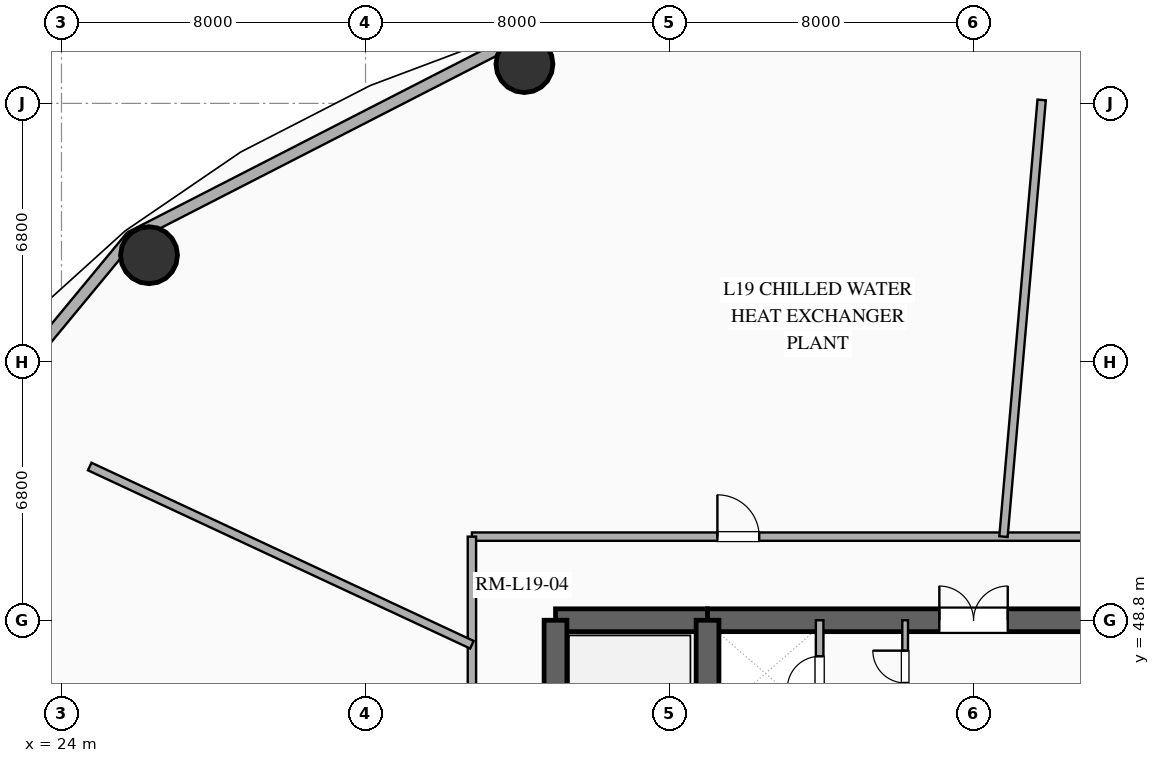
"""IFC4 building model, lengths in metres.
Left out: names, types, materials, properties, quantities, classifications, styles, units other than length and angle.
Written with IfcOpenShell. Run it as: python <this file> out.ifc"""

import sys

from ifc_helpers import new_model, si_unit, direction, frame, frame_2d, origin, origin_2d, place, context, subcontext, project, spatial, rectangle, hollow_circle, extrude, element, fill, save


model = new_model("IFC4")
c1 = context("Model", 3, precision=1e-05, world=origin(), true_north=direction((0.0, 1.0)))
c2 = subcontext(c1, "Body", "Model", "MODEL_VIEW")
j1 = project(units=[si_unit("LENGTHUNIT", "METRE"), si_unit("PLANEANGLEUNIT", "RADIAN")], contexts=[c1])
p1 = place(None, origin())
s1 = spatial("IfcSite", under=j1, at=p1, CompositionType="ELEMENT")
p2 = place(p1, origin())
s2 = spatial("IfcBuilding", under=s1, at=p2, CompositionType="ELEMENT")
p3 = place(p2, frame((0.0, 0.0, 78.6)))
s3 = spatial("IfcBuildingStorey", under=s2, at=p3, CompositionType="ELEMENT", Elevation=78.6)
p4 = place(p3, frame((37.0, 48.8, 0.0), z_axis=(0.0, 0.0, 1.0), x_axis=(1.0, 0.0, 0.0)))
e1 = element("IfcWall", 1, at=p4, inside=s3, PredefinedType="SHEAR", context=c2, shape_type="SweptSolid", body=[
    extrude(rectangle(XDim=4.0, YDim=0.6, at=frame_2d((2.0, 0.0))), origin(), (0.0, 0.0, 1.0), 5.15),
])
p5 = place(p3, frame((41.0, 48.8, 0.0), z_axis=(0.0, 0.0, 1.0), x_axis=(1.0, 0.0, 0.0)))
e2 = element("IfcWall", 2, at=p5, inside=s3, PredefinedType="SHEAR", context=c2, shape_type="SweptSolid", body=[
    extrude(rectangle(XDim=14.0, YDim=0.6, at=frame_2d((7.0, 0.0))), origin(), (0.0, 0.0, 1.0), 5.15),
])
p6 = place(p5, frame((6.1, 0.0, 0.0)))
e3 = element("IfcOpeningElement", 3, at=p6, cuts=e2, PredefinedType="OPENING", context=c2, shape_type="SweptSolid", body=[
    extrude(rectangle(XDim=1.8, YDim=2.25, at=frame_2d((0.9, 1.125))), frame((0.0, 0.31, 0.0), z_axis=(0.0, -1.0, 0.0), x_axis=(1.0, 0.0, 0.0)), (0.0, 0.0, 1.0), 0.62),
])
p7 = place(p3, frame((37.0, 35.2, 0.0), z_axis=(0.0, 0.0, 1.0), x_axis=(0.0, 1.0, 0.0)))
e4 = element("IfcWall", 4, at=p7, inside=s3, PredefinedType="SHEAR", context=c2, shape_type="SweptSolid", body=[
    extrude(rectangle(XDim=13.6, YDim=0.6, at=frame_2d((6.8, 0.0))), origin(), (0.0, 0.0, 1.0), 5.15),
])
p8 = place(p7, frame((1.5, 0.0, 0.0)))
e5 = element("IfcOpeningElement", 5, at=p8, cuts=e4, PredefinedType="OPENING", context=c2, shape_type="SweptSolid", body=[
    extrude(rectangle(XDim=1.2, YDim=2.15, at=frame_2d((0.6, 1.075))), frame((0.0, 0.31, 0.0), z_axis=(0.0, -1.0, 0.0), x_axis=(1.0, 0.0, 0.0)), (0.0, 0.0, 1.0), 0.62),
])
p9 = place(p3, frame((41.0, 35.2, 0.0), z_axis=(0.0, 0.0, 1.0), x_axis=(0.0, 1.0, 0.0)))
e6 = element("IfcWall", 6, at=p9, inside=s3, PredefinedType="SHEAR", context=c2, shape_type="SweptSolid", body=[
    extrude(rectangle(XDim=13.6, YDim=0.6, at=frame_2d((6.8, 0.0))), origin(), (0.0, 0.0, 1.0), 5.15),
])
p10 = place(p9, frame((1.15, 0.0, 0.0)))
e7 = element("IfcOpeningElement", 7, at=p10, cuts=e6, PredefinedType="OPENING", context=c2, shape_type="SweptSolid", body=[
    extrude(rectangle(XDim=1.1, YDim=2.2, at=frame_2d((0.55, 1.1))), frame((0.0, 0.31, 0.0), z_axis=(0.0, -1.0, 0.0), x_axis=(1.0, 0.0, 0.0)), (0.0, 0.0, 1.0), 0.62),
])
for number, where, z_axis, x_axis in (
    (8, (36.182, 63.434, 0.0), (0.0, 0.0, 1.0), (1.0, 0.0, 0.0)),
    (9, (26.303, 58.405, 0.0), (0.0, 0.0, 1.0), (1.0, 0.0, 0.0)),
):
    element("IfcColumn", number, at=place(p3, frame(where, z_axis=z_axis, x_axis=x_axis)), inside=s3, PredefinedType="COLUMN", context=c2, shape_type="SweptSolid", body=[
        extrude(hollow_circle(Radius=0.75, WallThickness=0.04, at=origin_2d()), origin(), (0.0, 0.0, 1.0), 5.15),
    ])
p11 = place(p3, frame((35.922, 64.062, 0.0), z_axis=(0.0, 0.0, 1.0), x_axis=(-0.889853976658, -0.456245438581, 0.0)))
e10 = element("IfcWall", 10, at=p11, inside=s3, PredefinedType="SOLIDWALL", context=c2, shape_type="SweptSolid", body=[
    extrude(rectangle(XDim=11.346, YDim=0.3, at=frame_2d((5.673, 0.0))), origin(), (0.0, 0.0, 1.0), 5.15),
])
p12 = place(p3, frame((25.826, 58.886, 0.0), z_axis=(0.0, 0.0, 1.0), x_axis=(-0.637296809613, -0.770618437657, 0.0)))
e11 = element("IfcWall", 11, at=p12, inside=s3, PredefinedType="SOLIDWALL", context=c2, shape_type="SweptSolid", body=[
    extrude(rectangle(XDim=10.053, YDim=0.3, at=frame_2d((5.027, 0.0))), origin(), (0.0, 0.0, 1.0), 5.15),
])
p13 = place(p3, frame((43.95, 46.2, 0.0), z_axis=(0.0, 0.0, 1.0), x_axis=(0.0, 1.0, 0.0)))
e12 = element("IfcWall", 12, at=p13, inside=s3, PredefinedType="SOLIDWALL", context=c2, shape_type="SweptSolid", body=[
    extrude(rectangle(XDim=2.6, YDim=0.2, at=frame_2d((1.3, 0.0))), origin(), (0.0, 0.0, 1.0), 3.45),
])
p14 = place(p13, frame((0.8, 0.0, 0.0)))
e13 = element("IfcOpeningElement", 13, at=p14, cuts=e12, PredefinedType="OPENING", context=c2, shape_type="SweptSolid", body=[
    extrude(rectangle(XDim=0.85, YDim=2.15, at=frame_2d((0.425, 1.075))), frame((0.0, 0.11, 0.0), z_axis=(0.0, -1.0, 0.0), x_axis=(1.0, 0.0, 0.0)), (0.0, 0.0, 1.0), 0.22),
])
p15 = place(p3, frame((46.2, 46.4, 0.0), z_axis=(0.0, 0.0, 1.0), x_axis=(0.0, 1.0, 0.0)))
e14 = element("IfcWall", 14, at=p15, inside=s3, PredefinedType="PARTITIONING", context=c2, shape_type="SweptSolid", body=[
    extrude(rectangle(XDim=2.4, YDim=0.15, at=frame_2d((1.2, 0.0))), origin(), (0.0, 0.0, 1.0), 3.45),
])
p16 = place(p15, frame((0.75, 0.0, 0.0)))
e15 = element("IfcOpeningElement", 15, at=p16, cuts=e14, PredefinedType="OPENING", context=c2, shape_type="SweptSolid", body=[
    extrude(rectangle(XDim=0.85, YDim=2.15, at=frame_2d((0.425, 1.075))), frame((0.0, 0.085, 0.0), z_axis=(0.0, -1.0, 0.0), x_axis=(1.0, 0.0, 0.0)), (0.0, 0.0, 1.0), 0.17),
])
p17 = place(p3, frame((34.8, 51.0, 0.0), z_axis=(0.0, 0.0, 1.0), x_axis=(1.0, 0.0, 0.0)))
e16 = element("IfcWall", 16, at=p17, inside=s3, PredefinedType="SOLIDWALL", context=c2, shape_type="SweptSolid", body=[
    extrude(rectangle(XDim=26.4, YDim=0.22, at=frame_2d((13.2, 0.0))), origin(), (0.0, 0.0, 1.0), 3.45),
])
p18 = place(p17, frame((6.46, 0.0, 0.0)))
e17 = element("IfcOpeningElement", 17, at=p18, cuts=e16, PredefinedType="OPENING", context=c2, shape_type="SweptSolid", body=[
    extrude(rectangle(XDim=1.1, YDim=2.15, at=frame_2d((0.55, 1.075))), frame((0.0, 0.12, 0.0), z_axis=(0.0, -1.0, 0.0), x_axis=(1.0, 0.0, 0.0)), (0.0, 0.0, 1.0), 0.24),
])
p19 = place(p17, frame((19.628, 0.0, 0.0)))
e18 = element("IfcOpeningElement", 18, at=p19, cuts=e16, PredefinedType="OPENING", context=c2, shape_type="SweptSolid", body=[
    extrude(rectangle(XDim=1.1, YDim=2.15, at=frame_2d((0.55, 1.075))), frame((0.0, 0.12, 0.0), z_axis=(0.0, -1.0, 0.0), x_axis=(1.0, 0.0, 0.0)), (0.0, 0.0, 1.0), 0.24),
])
p20 = place(p3, frame((34.8, 33.0, 0.0), z_axis=(0.0, 0.0, 1.0), x_axis=(0.0, 1.0, 0.0)))
e19 = element("IfcWall", 19, at=p20, inside=s3, PredefinedType="SOLIDWALL", context=c2, shape_type="SweptSolid", body=[
    extrude(rectangle(XDim=18.0, YDim=0.22, at=frame_2d((9.0, 0.0))), origin(), (0.0, 0.0, 1.0), 3.45),
])
p21 = place(p20, frame((8.45, 0.0, 0.0)))
e20 = element("IfcOpeningElement", 20, at=p21, cuts=e19, PredefinedType="OPENING", context=c2, shape_type="SweptSolid", body=[
    extrude(rectangle(XDim=1.1, YDim=2.15, at=frame_2d((0.55, 1.075))), frame((0.0, 0.12, 0.0), z_axis=(0.0, -1.0, 0.0), x_axis=(1.0, 0.0, 0.0)), (0.0, 0.0, 1.0), 0.24),
])
p22 = place(p3, frame((48.787, 51.0, 0.0), z_axis=(0.0, 0.0, 1.0), x_axis=(0.087147518891, 0.996195417552, 0.0)))
e21 = element("IfcWall", 21, at=p22, inside=s3, PredefinedType="SOLIDWALL", context=c2, shape_type="SweptSolid", body=[
    extrude(rectangle(XDim=11.534, YDim=0.22, at=frame_2d((5.767, 0.0))), origin(), (0.0, 0.0, 1.0), 3.45),
])
p23 = place(p3, frame((24.742, 52.845, 0.0), z_axis=(0.0, 0.0, 1.0), x_axis=(0.906311802903, -0.422609649581, 0.0)))
e22 = element("IfcWall", 22, at=p23, inside=s3, PredefinedType="SOLIDWALL", context=c2, shape_type="SweptSolid", body=[
    extrude(rectangle(XDim=11.098, YDim=0.22, at=frame_2d((5.549, 0.0))), origin(), (0.0, 0.0, 1.0), 3.45),
])
p24 = place(p6, origin())
e23 = element("IfcDoor", 23, at=p24, inside=s3, OperationType="DOUBLE_DOOR_SINGLE_SWING", PredefinedType="DOOR", context=c2, shape_type="SweptSolid", body=[
    extrude(rectangle(XDim=1.8, YDim=2.25, at=frame_2d((0.9, 1.125))), frame((0.0, 0.025, 0.0), z_axis=(0.0, -1.0, 0.0), x_axis=(1.0, 0.0, 0.0)), (0.0, 0.0, 1.0), 0.05),
])
fill(e3, e23)
p25 = place(p14, origin())
e24 = element("IfcDoor", 24, at=p25, inside=s3, OperationType="SINGLE_SWING_LEFT", PredefinedType="DOOR", context=c2, shape_type="SweptSolid", body=[
    extrude(rectangle(XDim=0.85, YDim=2.15, at=frame_2d((0.425, 1.075))), frame((0.0, 0.025, 0.0), z_axis=(0.0, -1.0, 0.0), x_axis=(1.0, 0.0, 0.0)), (0.0, 0.0, 1.0), 0.05),
])
fill(e13, e24)
p26 = place(p16, origin())
e25 = element("IfcDoor", 25, at=p26, inside=s3, OperationType="SINGLE_SWING_RIGHT", PredefinedType="DOOR", context=c2, shape_type="SweptSolid", body=[
    extrude(rectangle(XDim=0.85, YDim=2.15, at=frame_2d((0.425, 1.075))), frame((0.0, 0.025, 0.0), z_axis=(0.0, -1.0, 0.0), x_axis=(1.0, 0.0, 0.0)), (0.0, 0.0, 1.0), 0.05),
])
fill(e15, e25)
p27 = place(p18, origin())
e26 = element("IfcDoor", 26, at=p27, inside=s3, OperationType="SINGLE_SWING_LEFT", PredefinedType="DOOR", context=c2, shape_type="SweptSolid", body=[
    extrude(rectangle(XDim=1.1, YDim=2.15, at=frame_2d((0.55, 1.075))), frame((0.0, 0.025, 0.0), z_axis=(0.0, -1.0, 0.0), x_axis=(1.0, 0.0, 0.0)), (0.0, 0.0, 1.0), 0.05),
])
fill(e17, e26)
save(model, sys.argv[1])
